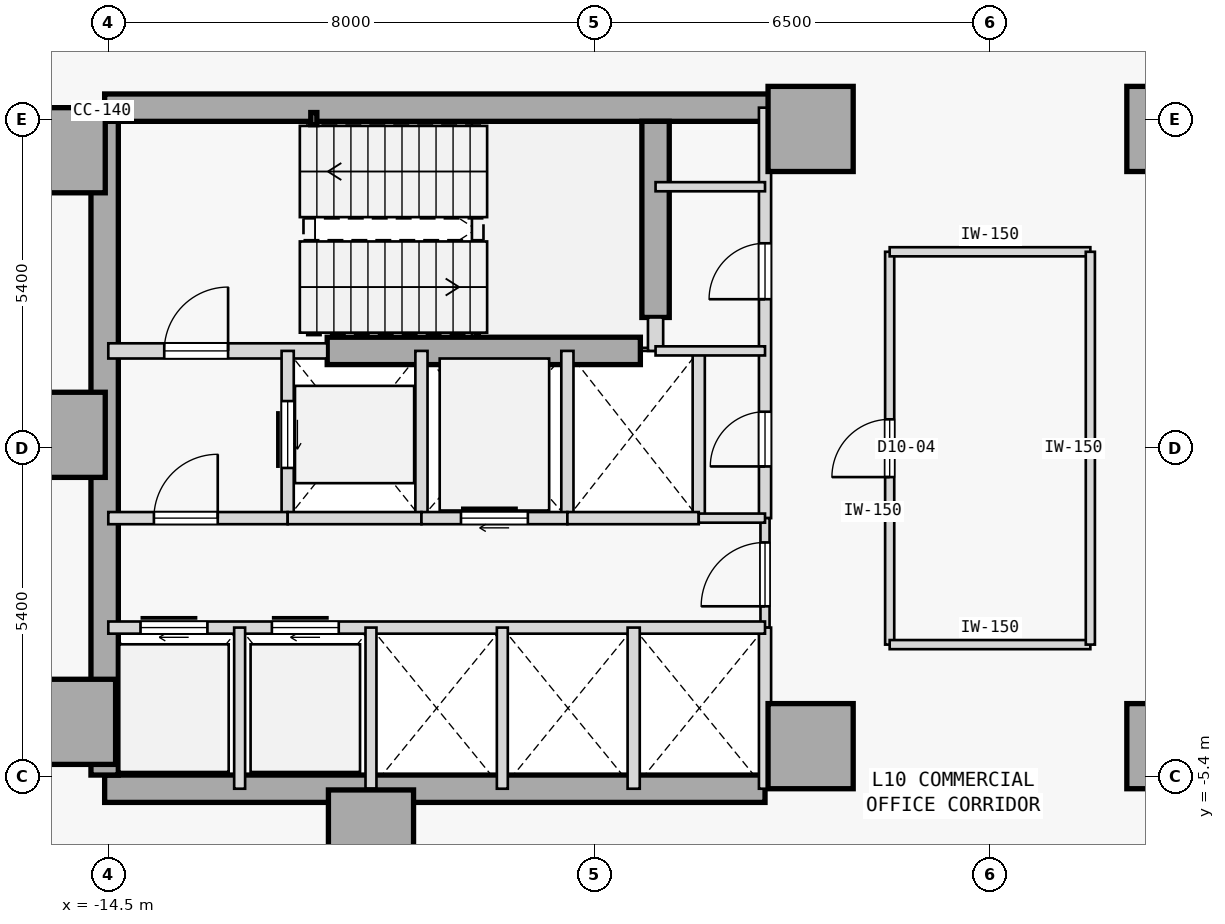
"""IFC4 building model, lengths in metres.
Left out: names, types, materials, properties, quantities, classifications, styles, units other than length and angle.
Written with IfcOpenShell. Run it as: python <this file> out.ifc"""

import sys

from ifc_helpers import new_model, si_unit, direction, frame, frame_2d, origin, origin_2d, place, context, subcontext, project, spatial, rectangle, hollow_rectangle, extrude, element, fill, save


model = new_model("IFC4")
c1 = context("Model", 3, precision=1e-05, world=origin(), true_north=direction((0.0, 1.0)))
c2 = subcontext(c1, "Body", "Model", "MODEL_VIEW")
j1 = project(units=[si_unit("LENGTHUNIT", "METRE"), si_unit("PLANEANGLEUNIT", "RADIAN")], contexts=[c1])
p1 = place(None, origin())
s1 = spatial("IfcSite", under=j1, at=p1, CompositionType="ELEMENT")
p2 = place(p1, origin())
s2 = spatial("IfcBuilding", under=s1, at=p2, CompositionType="ELEMENT")
p3 = place(p2, frame((0.0, 0.0, 44.6)))
s3 = spatial("IfcBuildingStorey", under=s2, at=p3, CompositionType="ELEMENT", Elevation=44.6)
for number, where, z_axis, x_axis in (
    (1, (-15.25, 4.9, 0.0), (0.0, 0.0, 1.0), (1.0, 0.0, 0.0)),
    (2, (-15.25, 0.22, 0.0), (0.0, 0.0, 1.0), (1.0, 0.0, 0.0)),
    (3, (-15.08, -4.5, 0.0), (0.0, 0.0, 1.0), (1.0, 0.0, 0.0)),
    (4, (-10.18, -6.32, 0.0), (0.0, 0.0, 1.0), (1.0, 0.0, 0.0)),
    (5, (-2.95, -4.9, 0.0), (0.0, 0.0, 1.0), (1.0, 0.0, 0.0)),
    (6, (-2.95, 5.25, 0.0), (0.0, 0.0, 1.0), (1.0, 0.0, 0.0)),
    (7, (2.95, -4.9, 0.0), (0.0, 0.0, 1.0), (1.0, 0.0, 0.0)),
    (8, (2.95, 5.25, 0.0), (0.0, 0.0, 1.0), (1.0, 0.0, 0.0)),
):
    element("IfcColumn", number, at=place(p3, frame(where, z_axis=z_axis, x_axis=x_axis)), inside=s3, PredefinedType="COLUMN", context=c2, shape_type="SweptSolid", body=[
        extrude(rectangle(XDim=1.4, YDim=1.4, at=origin_2d()), origin(), (0.0, 0.0, 1.0), 3.8),
    ])
p4 = place(p3, frame((-14.56, 5.6, 0.0), z_axis=(0.0, 0.0, 1.0), x_axis=(1.0, 0.0, 0.0)))
e9 = element("IfcWall", 9, at=p4, inside=s3, PredefinedType="SHEAR", context=c2, shape_type="SweptSolid", body=[
    extrude(rectangle(XDim=11.41, YDim=0.45, at=frame_2d((5.705, 0.0))), origin(), (0.0, 0.0, 1.0), 3.575),
])
p5 = place(p3, frame((-14.56, -5.6, 0.0), z_axis=(0.0, 0.0, 1.0), x_axis=(1.0, 0.0, 0.0)))
e10 = element("IfcWall", 10, at=p5, inside=s3, PredefinedType="SHEAR", context=c2, shape_type="SweptSolid", body=[
    extrude(rectangle(XDim=10.86, YDim=0.45, at=frame_2d((5.43, 0.0))), origin(), (0.0, 0.0, 1.0), 3.575),
])
p6 = place(p3, frame((-14.56, -5.375, 0.0), z_axis=(0.0, 0.0, 1.0), x_axis=(0.0, 1.0, 0.0)))
e11 = element("IfcWall", 11, at=p6, inside=s3, PredefinedType="SHEAR", context=c2, shape_type="SweptSolid", body=[
    extrude(rectangle(XDim=10.75, YDim=0.45, at=frame_2d((5.375, 0.0))), origin(), (0.0, 0.0, 1.0), 3.575),
])
p7 = place(p3, frame((-5.5, 2.15, 0.0), z_axis=(0.0, 0.0, 1.0), x_axis=(0.0, 1.0, 0.0)))
e12 = element("IfcWall", 12, at=p7, inside=s3, PredefinedType="SHEAR", context=c2, shape_type="SweptSolid", body=[
    extrude(rectangle(XDim=3.225, YDim=0.45, at=frame_2d((1.613, 0.0))), origin(), (0.0, 0.0, 1.0), 3.575),
])
p8 = place(p3, frame((-10.9, 1.6, 0.0), z_axis=(0.0, 0.0, 1.0), x_axis=(1.0, 0.0, 0.0)))
e13 = element("IfcWall", 13, at=p8, inside=s3, PredefinedType="SHEAR", context=c2, shape_type="SweptSolid", body=[
    extrude(rectangle(XDim=5.15, YDim=0.45, at=frame_2d((2.575, 0.0))), origin(), (0.0, 0.0, 1.0), 3.575),
])
p9 = place(p3, frame((-11.12, 5.42, 0.0), z_axis=(0.0, 0.0, 1.0), x_axis=(1.0, 0.0, 0.0)))
e14 = element("IfcColumn", 14, at=p9, inside=s3, PredefinedType="COLUMN", context=c2, shape_type="SweptSolid", body=[
    extrude(hollow_rectangle(XDim=0.1, YDim=0.2, WallThickness=0.008, at=origin_2d()), origin(), (0.0, 0.0, 1.0), 3.8),
])
p10 = place(p3, frame((-14.5, 1.6, 0.0), z_axis=(0.0, 0.0, 1.0), x_axis=(1.0, 0.0, 0.0)))
e15 = element("IfcWall", 15, at=p10, inside=s3, PredefinedType="STANDARD", context=c2, shape_type="SweptSolid", body=[
    extrude(rectangle(XDim=3.6, YDim=0.25, at=frame_2d((1.8, 0.0))), origin(), (0.0, 0.0, 1.0), 3.575),
])
p11 = place(p10, frame((0.92, 0.0, 0.0)))
e16 = element("IfcOpeningElement", 16, at=p11, cuts=e15, PredefinedType="OPENING", context=c2, shape_type="SweptSolid", body=[
    extrude(rectangle(XDim=1.05, YDim=2.15, at=frame_2d((0.525, 1.075))), frame((0.0, 0.135, 0.0), z_axis=(0.0, -1.0, 0.0), x_axis=(1.0, 0.0, 0.0)), (0.0, 0.0, 1.0), 0.27),
])
p12 = place(p3, frame((-5.5, 1.6, 0.0), z_axis=(0.0, 0.0, 1.0), x_axis=(0.0, 1.0, 0.0)))
e17 = element("IfcWall", 17, at=p12, inside=s3, PredefinedType="STANDARD", context=c2, shape_type="SweptSolid", body=[
    extrude(rectangle(XDim=0.55, YDim=0.25, at=frame_2d((0.275, 0.0))), origin(), (0.0, 0.0, 1.0), 3.575),
])
p13 = place(p3, frame((-3.7, -1.15, 0.0), z_axis=(0.0, 0.0, 1.0), x_axis=(0.0, 1.0, 0.0)))
e18 = element("IfcWall", 18, at=p13, inside=s3, PredefinedType="STANDARD", context=c2, shape_type="SweptSolid", body=[
    extrude(rectangle(XDim=6.75, YDim=0.2, at=frame_2d((3.375, 0.0))), origin(), (0.0, 0.0, 1.0), 3.575),
])
p14 = place(p13, frame((3.6, 0.0, 0.0)))
e19 = element("IfcOpeningElement", 19, at=p14, cuts=e18, PredefinedType="OPENING", context=c2, shape_type="SweptSolid", body=[
    extrude(rectangle(XDim=0.92, YDim=2.15, at=frame_2d((0.46, 1.075))), frame((0.0, 0.11, 0.0), z_axis=(0.0, -1.0, 0.0), x_axis=(1.0, 0.0, 0.0)), (0.0, 0.0, 1.0), 0.22),
])
p15 = place(p13, frame((0.85, 0.0, 0.0)))
e20 = element("IfcOpeningElement", 20, at=p15, cuts=e18, PredefinedType="OPENING", context=c2, shape_type="SweptSolid", body=[
    extrude(rectangle(XDim=0.9, YDim=2.15, at=frame_2d((0.45, 1.075))), frame((0.0, 0.11, 0.0), z_axis=(0.0, -1.0, 0.0), x_axis=(1.0, 0.0, 0.0)), (0.0, 0.0, 1.0), 0.22),
])
p16 = place(p3, frame((-3.7, -2.95, 0.0), z_axis=(0.0, 0.0, 1.0), x_axis=(0.0, 1.0, 0.0)))
e21 = element("IfcWall", 21, at=p16, inside=s3, PredefinedType="PARTITIONING", context=c2, shape_type="SweptSolid", body=[
    extrude(rectangle(XDim=1.8, YDim=0.15, at=frame_2d((0.9, 0.0))), origin(), (0.0, 0.0, 1.0), 3.575),
])
p17 = place(p16, frame((0.35, 0.0, 0.0)))
e22 = element("IfcOpeningElement", 22, at=p17, cuts=e21, PredefinedType="OPENING", context=c2, shape_type="SweptSolid", body=[
    extrude(rectangle(XDim=1.05, YDim=2.18, at=frame_2d((0.525, 1.09))), frame((0.0, 0.085, 0.0), z_axis=(0.0, -1.0, 0.0), x_axis=(1.0, 0.0, 0.0)), (0.0, 0.0, 1.0), 0.17),
])
p18 = place(p3, frame((-3.7, -5.6, 0.0), z_axis=(0.0, 0.0, 1.0), x_axis=(0.0, 1.0, 0.0)))
e23 = element("IfcWall", 23, at=p18, inside=s3, PredefinedType="STANDARD", context=c2, shape_type="SweptSolid", body=[
    extrude(rectangle(XDim=2.65, YDim=0.2, at=frame_2d((1.325, 0.0))), origin(), (0.0, 0.0, 1.0), 3.575),
])
p19 = place(p3, frame((-11.55, -1.15, 0.0), z_axis=(0.0, 0.0, 1.0), x_axis=(0.0, 1.0, 0.0)))
e24 = element("IfcWall", 24, at=p19, inside=s3, PredefinedType="STANDARD", context=c2, shape_type="SweptSolid", body=[
    extrude(rectangle(XDim=2.75, YDim=0.2, at=frame_2d((1.375, 0.0))), origin(), (0.0, 0.0, 1.0), 3.575),
])
p20 = place(p19, frame((0.825, 0.0, 0.0)))
e25 = element("IfcOpeningElement", 25, at=p20, cuts=e24, PredefinedType="OPENING", context=c2, shape_type="SweptSolid", body=[
    extrude(rectangle(XDim=1.1, YDim=2.15, at=frame_2d((0.55, 1.075))), frame((0.0, 0.11, 0.0), z_axis=(0.0, -1.0, 0.0), x_axis=(1.0, 0.0, 0.0)), (0.0, 0.0, 1.0), 0.22),
])
p21 = place(p3, frame((-9.35, -1.15, 0.0), z_axis=(0.0, 0.0, 1.0), x_axis=(0.0, 1.0, 0.0)))
e26 = element("IfcWall", 26, at=p21, inside=s3, PredefinedType="STANDARD", context=c2, shape_type="SweptSolid", body=[
    extrude(rectangle(XDim=2.75, YDim=0.2, at=frame_2d((1.375, 0.0))), origin(), (0.0, 0.0, 1.0), 3.575),
])
p22 = place(p3, frame((-14.5, -1.15, 0.0), z_axis=(0.0, 0.0, 1.0), x_axis=(1.0, 0.0, 0.0)))
e27 = element("IfcWall", 27, at=p22, inside=s3, PredefinedType="STANDARD", context=c2, shape_type="SweptSolid", body=[
    extrude(rectangle(XDim=2.95, YDim=0.2, at=frame_2d((1.475, 0.0))), origin(), (0.0, 0.0, 1.0), 3.575),
])
p23 = place(p22, frame((0.75, 0.0, 0.0)))
e28 = element("IfcOpeningElement", 28, at=p23, cuts=e27, PredefinedType="OPENING", context=c2, shape_type="SweptSolid", body=[
    extrude(rectangle(XDim=1.05, YDim=2.18, at=frame_2d((0.525, 1.09))), frame((0.0, 0.11, 0.0), z_axis=(0.0, -1.0, 0.0), x_axis=(1.0, 0.0, 0.0)), (0.0, 0.0, 1.0), 0.22),
])
p24 = place(p3, frame((-11.55, -1.15, 0.0), z_axis=(0.0, 0.0, 1.0), x_axis=(1.0, 0.0, 0.0)))
e29 = element("IfcWall", 29, at=p24, inside=s3, PredefinedType="STANDARD", context=c2, shape_type="SweptSolid", body=[
    extrude(rectangle(XDim=2.2, YDim=0.2, at=frame_2d((1.1, 0.0))), origin(), (0.0, 0.0, 1.0), 3.575),
])
p25 = place(p3, frame((-6.95, -1.15, 0.0), z_axis=(0.0, 0.0, 1.0), x_axis=(0.0, 1.0, 0.0)))
e30 = element("IfcWall", 30, at=p25, inside=s3, PredefinedType="STANDARD", context=c2, shape_type="SweptSolid", body=[
    extrude(rectangle(XDim=2.75, YDim=0.2, at=frame_2d((1.375, 0.0))), origin(), (0.0, 0.0, 1.0), 3.575),
])
p26 = place(p3, frame((-9.35, -1.15, 0.0), z_axis=(0.0, 0.0, 1.0), x_axis=(1.0, 0.0, 0.0)))
e31 = element("IfcWall", 31, at=p26, inside=s3, PredefinedType="STANDARD", context=c2, shape_type="SweptSolid", body=[
    extrude(rectangle(XDim=2.4, YDim=0.2, at=frame_2d((1.2, 0.0))), origin(), (0.0, 0.0, 1.0), 3.575),
])
p27 = place(p26, frame((0.65, 0.0, 0.0)))
e32 = element("IfcOpeningElement", 32, at=p27, cuts=e31, PredefinedType="OPENING", context=c2, shape_type="SweptSolid", body=[
    extrude(rectangle(XDim=1.1, YDim=2.15, at=frame_2d((0.55, 1.075))), frame((0.0, 0.11, 0.0), z_axis=(0.0, -1.0, 0.0), x_axis=(1.0, 0.0, 0.0)), (0.0, 0.0, 1.0), 0.22),
])
p28 = place(p3, frame((-4.79, -1.15, 0.0), z_axis=(0.0, 0.0, 1.0), x_axis=(0.0, 1.0, 0.0)))
e33 = element("IfcWall", 33, at=p28, inside=s3, PredefinedType="STANDARD", context=c2, shape_type="SweptSolid", body=[
    extrude(rectangle(XDim=2.75, YDim=0.2, at=frame_2d((1.375, 0.0))), origin(), (0.0, 0.0, 1.0), 3.575),
])
p29 = place(p3, frame((-6.95, -1.15, 0.0), z_axis=(0.0, 0.0, 1.0), x_axis=(1.0, 0.0, 0.0)))
e34 = element("IfcWall", 34, at=p29, inside=s3, PredefinedType="STANDARD", context=c2, shape_type="SweptSolid", body=[
    extrude(rectangle(XDim=2.16, YDim=0.2, at=frame_2d((1.08, 0.0))), origin(), (0.0, 0.0, 1.0), 3.575),
])
p30 = place(p3, frame((-4.79, -1.15, 0.0), z_axis=(0.0, 0.0, 1.0), x_axis=(1.0, 0.0, 0.0)))
e35 = element("IfcWall", 35, at=p30, inside=s3, PredefinedType="PARTITIONING", context=c2, shape_type="SweptSolid", body=[
    extrude(rectangle(XDim=1.09, YDim=0.15, at=frame_2d((0.545, 0.0))), origin(), (0.0, 0.0, 1.0), 3.575),
])
p31 = place(p3, frame((-14.5, -2.95, 0.0), z_axis=(0.0, 0.0, 1.0), x_axis=(1.0, 0.0, 0.0)))
e36 = element("IfcWall", 36, at=p31, inside=s3, PredefinedType="STANDARD", context=c2, shape_type="SweptSolid", body=[
    extrude(rectangle(XDim=10.8, YDim=0.2, at=frame_2d((5.4, 0.0))), origin(), (0.0, 0.0, 1.0), 3.575),
])
p32 = place(p31, frame((0.53, 0.0, 0.0)))
e37 = element("IfcOpeningElement", 37, at=p32, cuts=e36, PredefinedType="OPENING", context=c2, shape_type="SweptSolid", body=[
    extrude(rectangle(XDim=1.1, YDim=2.15, at=frame_2d((0.55, 1.075))), frame((0.0, 0.11, 0.0), z_axis=(0.0, -1.0, 0.0), x_axis=(1.0, 0.0, 0.0)), (0.0, 0.0, 1.0), 0.22),
])
p33 = place(p31, frame((2.69, 0.0, 0.0)))
e38 = element("IfcOpeningElement", 38, at=p33, cuts=e36, PredefinedType="OPENING", context=c2, shape_type="SweptSolid", body=[
    extrude(rectangle(XDim=1.1, YDim=2.15, at=frame_2d((0.55, 1.075))), frame((0.0, 0.11, 0.0), z_axis=(0.0, -1.0, 0.0), x_axis=(1.0, 0.0, 0.0)), (0.0, 0.0, 1.0), 0.22),
])
p34 = place(p3, frame((-5.86, -5.6, 0.0), z_axis=(0.0, 0.0, 1.0), x_axis=(0.0, 1.0, 0.0)))
e39 = element("IfcWall", 39, at=p34, inside=s3, PredefinedType="STANDARD", context=c2, shape_type="SweptSolid", body=[
    extrude(rectangle(XDim=2.65, YDim=0.2, at=frame_2d((1.325, 0.0))), origin(), (0.0, 0.0, 1.0), 3.575),
])
for number, where, z_axis, x_axis in (
    (40, (-12.34, -5.6, 0.0), (0.0, 0.0, 1.0), (0.0, 1.0, 0.0)),
    (41, (-10.18, -5.6, 0.0), (0.0, 0.0, 1.0), (0.0, 1.0, 0.0)),
    (42, (-8.02, -5.6, 0.0), (0.0, 0.0, 1.0), (0.0, 1.0, 0.0)),
):
    element("IfcWall", number, at=place(p3, frame(where, z_axis=z_axis, x_axis=x_axis)), inside=s3, PredefinedType="STANDARD", context=c2, shape_type="SweptSolid", body=[
        extrude(rectangle(XDim=2.65, YDim=0.18, at=frame_2d((1.325, 0.0))), origin(), (0.0, 0.0, 1.0), 3.575),
    ])
for number, where, z_axis, x_axis in (
    (43, (-5.5, 4.3, 0.0), (0.0, 0.0, 1.0), (1.0, 0.0, 0.0)),
    (44, (-5.5, 1.6, 0.0), (0.0, 0.0, 1.0), (1.0, 0.0, 0.0)),
):
    element("IfcWall", number, at=place(p3, frame(where, z_axis=z_axis, x_axis=x_axis)), inside=s3, PredefinedType="PARTITIONING", context=c2, shape_type="SweptSolid", body=[
        extrude(rectangle(XDim=1.8, YDim=0.15, at=frame_2d((0.9, 0.0))), origin(), (0.0, 0.0, 1.0), 3.575),
    ])
p35 = place(p3, frame((-1.65, -3.23, 0.0), z_axis=(0.0, 0.0, 1.0), x_axis=(0.0, 1.0, 0.0)))
e45 = element("IfcWall", 45, at=p35, inside=s3, PredefinedType="PARTITIONING", context=c2, shape_type="SweptSolid", body=[
    extrude(rectangle(XDim=6.46, YDim=0.15, at=frame_2d((3.23, 0.0))), origin(), (0.0, 0.0, 1.0), 3.575),
])
p36 = place(p35, frame((2.755, 0.0, 0.0)))
e46 = element("IfcOpeningElement", 46, at=p36, cuts=e45, PredefinedType="OPENING", context=c2, shape_type="SweptSolid", body=[
    extrude(rectangle(XDim=0.95, YDim=2.15, at=frame_2d((0.475, 1.075))), frame((0.0, 0.085, 0.0), z_axis=(0.0, -1.0, 0.0), x_axis=(1.0, 0.0, 0.0)), (0.0, 0.0, 1.0), 0.17),
])
for number, where, z_axis, x_axis in (
    (47, (-1.65, -3.23, 0.0), (0.0, 0.0, 1.0), (1.0, 0.0, 0.0)),
    (48, (-1.65, 3.23, 0.0), (0.0, 0.0, 1.0), (1.0, 0.0, 0.0)),
):
    element("IfcWall", number, at=place(p3, frame(where, z_axis=z_axis, x_axis=x_axis)), inside=s3, PredefinedType="PARTITIONING", context=c2, shape_type="SweptSolid", body=[
        extrude(rectangle(XDim=3.3, YDim=0.15, at=frame_2d((1.65, 0.0))), origin(), (0.0, 0.0, 1.0), 3.575),
    ])
p37 = place(p3, frame((1.65, -3.23, 0.0), z_axis=(0.0, 0.0, 1.0), x_axis=(0.0, 1.0, 0.0)))
e49 = element("IfcWall", 49, at=p37, inside=s3, PredefinedType="PARTITIONING", context=c2, shape_type="SweptSolid", body=[
    extrude(rectangle(XDim=6.46, YDim=0.15, at=frame_2d((3.23, 0.0))), origin(), (0.0, 0.0, 1.0), 3.575),
])
p38 = place(p11, origin())
e50 = element("IfcDoor", 50, at=p38, inside=s3, OperationType="SINGLE_SWING_RIGHT", PredefinedType="DOOR", context=c2, shape_type="SweptSolid", body=[
    extrude(rectangle(XDim=1.05, YDim=2.15, at=frame_2d((0.525, 1.075))), frame((0.0, 0.025, 0.0), z_axis=(0.0, -1.0, 0.0), x_axis=(1.0, 0.0, 0.0)), (0.0, 0.0, 1.0), 0.05),
])
fill(e16, e50)
p39 = place(p23, origin())
e51 = element("IfcDoor", 51, at=p39, inside=s3, OperationType="SINGLE_SWING_RIGHT", PredefinedType="DOOR", context=c2, shape_type="SweptSolid", body=[
    extrude(rectangle(XDim=1.05, YDim=2.18, at=frame_2d((0.525, 1.09))), frame((0.0, 0.025, 0.0), z_axis=(0.0, -1.0, 0.0), x_axis=(1.0, 0.0, 0.0)), (0.0, 0.0, 1.0), 0.05),
])
fill(e28, e51)
p40 = place(p17, origin())
e52 = element("IfcDoor", 52, at=p40, inside=s3, OperationType="SINGLE_SWING_LEFT", PredefinedType="DOOR", context=c2, shape_type="SweptSolid", body=[
    extrude(rectangle(XDim=1.05, YDim=2.18, at=frame_2d((0.525, 1.09))), frame((0.0, 0.025, 0.0), z_axis=(0.0, -1.0, 0.0), x_axis=(1.0, 0.0, 0.0)), (0.0, 0.0, 1.0), 0.05),
])
fill(e22, e52)
p41 = place(p20, origin())
e53 = element("IfcDoor", 53, at=p41, inside=s3, OperationType="SLIDING_TO_RIGHT", PredefinedType="DOOR", context=c2, shape_type="SweptSolid", body=[
    extrude(rectangle(XDim=1.1, YDim=2.15, at=frame_2d((0.55, 1.075))), frame((0.0, 0.025, 0.0), z_axis=(0.0, -1.0, 0.0), x_axis=(1.0, 0.0, 0.0)), (0.0, 0.0, 1.0), 0.05),
])
fill(e25, e53)
p42 = place(p27, origin())
e54 = element("IfcDoor", 54, at=p42, inside=s3, OperationType="SLIDING_TO_RIGHT", PredefinedType="DOOR", context=c2, shape_type="SweptSolid", body=[
    extrude(rectangle(XDim=1.1, YDim=2.15, at=frame_2d((0.55, 1.075))), frame((0.0, 0.025, 0.0), z_axis=(0.0, -1.0, 0.0), x_axis=(1.0, 0.0, 0.0)), (0.0, 0.0, 1.0), 0.05),
])
fill(e32, e54)
p43 = place(p32, origin())
e55 = element("IfcDoor", 55, at=p43, inside=s3, OperationType="SLIDING_TO_RIGHT", PredefinedType="DOOR", context=c2, shape_type="SweptSolid", body=[
    extrude(rectangle(XDim=1.1, YDim=2.15, at=frame_2d((0.55, 1.075))), frame((0.0, 0.025, 0.0), z_axis=(0.0, -1.0, 0.0), x_axis=(1.0, 0.0, 0.0)), (0.0, 0.0, 1.0), 0.05),
])
fill(e37, e55)
p44 = place(p33, origin())
e56 = element("IfcDoor", 56, at=p44, inside=s3, OperationType="SLIDING_TO_RIGHT", PredefinedType="DOOR", context=c2, shape_type="SweptSolid", body=[
    extrude(rectangle(XDim=1.1, YDim=2.15, at=frame_2d((0.55, 1.075))), frame((0.0, 0.025, 0.0), z_axis=(0.0, -1.0, 0.0), x_axis=(1.0, 0.0, 0.0)), (0.0, 0.0, 1.0), 0.05),
])
fill(e38, e56)
p45 = place(p14, origin())
e57 = element("IfcDoor", 57, at=p45, inside=s3, OperationType="SINGLE_SWING_LEFT", PredefinedType="DOOR", context=c2, shape_type="SweptSolid", body=[
    extrude(rectangle(XDim=0.92, YDim=2.15, at=frame_2d((0.46, 1.075))), frame((0.0, 0.025, 0.0), z_axis=(0.0, -1.0, 0.0), x_axis=(1.0, 0.0, 0.0)), (0.0, 0.0, 1.0), 0.05),
])
fill(e19, e57)
p46 = place(p15, origin())
e58 = element("IfcDoor", 58, at=p46, inside=s3, OperationType="SINGLE_SWING_LEFT", PredefinedType="DOOR", context=c2, shape_type="SweptSolid", body=[
    extrude(rectangle(XDim=0.9, YDim=2.15, at=frame_2d((0.45, 1.075))), frame((0.0, 0.025, 0.0), z_axis=(0.0, -1.0, 0.0), x_axis=(1.0, 0.0, 0.0)), (0.0, 0.0, 1.0), 0.05),
])
fill(e20, e58)
p47 = place(p36, origin())
e59 = element("IfcDoor", 59, at=p47, inside=s3, OperationType="SINGLE_SWING_LEFT", PredefinedType="DOOR", context=c2, shape_type="SweptSolid", body=[
    extrude(rectangle(XDim=0.95, YDim=2.15, at=frame_2d((0.475, 1.075))), frame((0.0, 0.025, 0.0), z_axis=(0.0, -1.0, 0.0), x_axis=(1.0, 0.0, 0.0)), (0.0, 0.0, 1.0), 0.05),
])
fill(e46, e59)
save(model, sys.argv[1])
